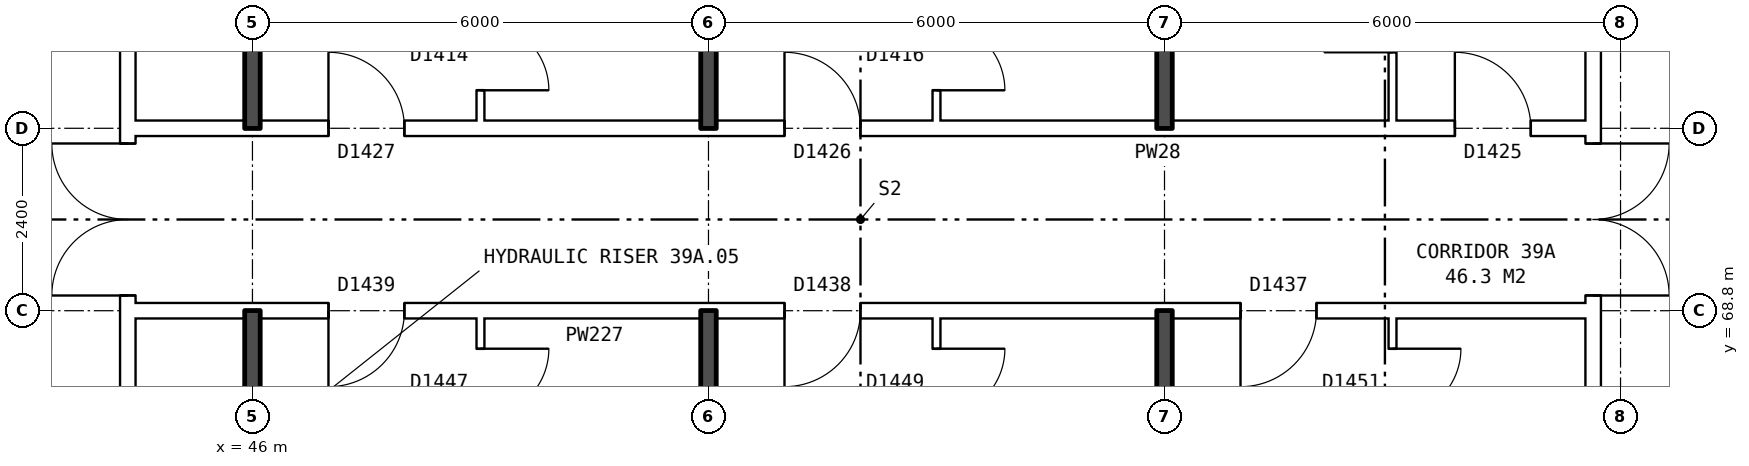
"""IFC4 building model, lengths in metres.
Left out: names, types, materials, properties, quantities, classifications, styles, units other than length and angle.
Written with IfcOpenShell. Run it as: python <this file> out.ifc"""

import sys

from ifc_helpers import new_model, si_unit, direction, frame, frame_2d, origin, place, context, subcontext, project, spatial, rectangle, extrude, element, fill, save


model = new_model("IFC4")
c1 = context("Model", 3, precision=1e-05, world=origin(), true_north=direction((0.0, 1.0)))
c2 = subcontext(c1, "Body", "Model", "MODEL_VIEW")
j1 = project(units=[si_unit("LENGTHUNIT", "METRE"), si_unit("PLANEANGLEUNIT", "RADIAN")], contexts=[c1])
p1 = place(None, origin())
s1 = spatial("IfcSite", under=j1, at=p1, CompositionType="ELEMENT")
p2 = place(p1, origin())
s2 = spatial("IfcBuilding", under=s1, at=p2, CompositionType="ELEMENT")
p3 = place(p2, frame((0.0, 0.0, 139.2)))
s3 = spatial("IfcBuildingStorey", under=s2, at=p3, CompositionType="ELEMENT", Elevation=139.2)
p4 = place(p3, frame((63.64, 63.9, 0.0), z_axis=(0.0, 0.0, 1.0), x_axis=(0.0, 1.0, 0.0)))
e1 = element("IfcWall", 1, at=p4, inside=s3, PredefinedType="PARTITIONING", context=c2, shape_type="SweptSolid", body=[
    extrude(rectangle(XDim=12.2, YDim=0.2, at=frame_2d((6.1, 0.0))), origin(), (0.0, 0.0, 1.0), 2.85),
])
p5 = place(p4, frame((5.1, 0.0, 0.0)))
e2 = element("IfcOpeningElement", 2, at=p5, cuts=e1, PredefinedType="OPENING", context=c2, shape_type="SweptSolid", body=[
    extrude(rectangle(XDim=2.0, YDim=2.1, at=frame_2d((1.0, 1.05))), frame((0.0, 0.11, 0.0), z_axis=(0.0, -1.0, 0.0), x_axis=(1.0, 0.0, 0.0)), (0.0, 0.0, 1.0), 0.22),
])
p6 = place(p3, frame((44.36, 63.9, 0.0), z_axis=(0.0, 0.0, 1.0), x_axis=(0.0, 1.0, 0.0)))
e3 = element("IfcWall", 3, at=p6, inside=s3, PredefinedType="PARTITIONING", context=c2, shape_type="SweptSolid", body=[
    extrude(rectangle(XDim=12.2, YDim=0.2, at=frame_2d((6.1, 0.0))), origin(), (0.0, 0.0, 1.0), 2.85),
])
p7 = place(p6, frame((5.1, 0.0, 0.0)))
e4 = element("IfcOpeningElement", 4, at=p7, cuts=e3, PredefinedType="OPENING", context=c2, shape_type="SweptSolid", body=[
    extrude(rectangle(XDim=2.0, YDim=2.1, at=frame_2d((1.0, 1.05))), frame((0.0, 0.11, 0.0), z_axis=(0.0, -1.0, 0.0), x_axis=(1.0, 0.0, 0.0)), (0.0, 0.0, 1.0), 0.22),
])
p8 = place(p3, frame((44.36, 68.8, 0.0), z_axis=(0.0, 0.0, 1.0), x_axis=(1.0, 0.0, 0.0)))
e5 = element("IfcWall", 5, at=p8, inside=s3, PredefinedType="PARTITIONING", context=c2, shape_type="SweptSolid", body=[
    extrude(rectangle(XDim=19.28, YDim=0.2, at=frame_2d((9.64, 0.0))), origin(), (0.0, 0.0, 1.0), 2.85),
])
p9 = place(p8, frame((14.64, 0.0, 0.0)))
e6 = element("IfcOpeningElement", 6, at=p9, cuts=e5, PredefinedType="OPENING", context=c2, shape_type="SweptSolid", body=[
    extrude(rectangle(XDim=1.0, YDim=2.1, at=frame_2d((0.5, 1.05))), frame((0.0, 0.11, 0.0), z_axis=(0.0, -1.0, 0.0), x_axis=(1.0, 0.0, 0.0)), (0.0, 0.0, 1.0), 0.22),
])
p10 = place(p8, frame((8.64, 0.0, 0.0)))
e7 = element("IfcOpeningElement", 7, at=p10, cuts=e5, PredefinedType="OPENING", context=c2, shape_type="SweptSolid", body=[
    extrude(rectangle(XDim=1.0, YDim=2.1, at=frame_2d((0.5, 1.05))), frame((0.0, 0.11, 0.0), z_axis=(0.0, -1.0, 0.0), x_axis=(1.0, 0.0, 0.0)), (0.0, 0.0, 1.0), 0.22),
])
p11 = place(p8, frame((2.64, 0.0, 0.0)))
e8 = element("IfcOpeningElement", 8, at=p11, cuts=e5, PredefinedType="OPENING", context=c2, shape_type="SweptSolid", body=[
    extrude(rectangle(XDim=1.0, YDim=2.1, at=frame_2d((0.5, 1.05))), frame((0.0, 0.11, 0.0), z_axis=(0.0, -1.0, 0.0), x_axis=(1.0, 0.0, 0.0)), (0.0, 0.0, 1.0), 0.22),
])
p12 = place(p3, frame((44.36, 71.2, 0.0), z_axis=(0.0, 0.0, 1.0), x_axis=(1.0, 0.0, 0.0)))
e9 = element("IfcWall", 9, at=p12, inside=s3, PredefinedType="PARTITIONING", context=c2, shape_type="SweptSolid", body=[
    extrude(rectangle(XDim=19.28, YDim=0.2, at=frame_2d((9.64, 0.0))), origin(), (0.0, 0.0, 1.0), 2.85),
])
p13 = place(p12, frame((17.46, 0.0, 0.0)))
e10 = element("IfcOpeningElement", 10, at=p13, cuts=e9, PredefinedType="OPENING", context=c2, shape_type="SweptSolid", body=[
    extrude(rectangle(XDim=1.0, YDim=2.1, at=frame_2d((0.5, 1.05))), frame((0.0, 0.11, 0.0), z_axis=(0.0, -1.0, 0.0), x_axis=(1.0, 0.0, 0.0)), (0.0, 0.0, 1.0), 0.22),
])
p14 = place(p12, frame((8.64, 0.0, 0.0)))
e11 = element("IfcOpeningElement", 11, at=p14, cuts=e9, PredefinedType="OPENING", context=c2, shape_type="SweptSolid", body=[
    extrude(rectangle(XDim=1.0, YDim=2.1, at=frame_2d((0.5, 1.05))), frame((0.0, 0.11, 0.0), z_axis=(0.0, -1.0, 0.0), x_axis=(1.0, 0.0, 0.0)), (0.0, 0.0, 1.0), 0.22),
])
p15 = place(p12, frame((2.64, 0.0, 0.0)))
e12 = element("IfcOpeningElement", 12, at=p15, cuts=e9, PredefinedType="OPENING", context=c2, shape_type="SweptSolid", body=[
    extrude(rectangle(XDim=1.0, YDim=2.1, at=frame_2d((0.5, 1.05))), frame((0.0, 0.11, 0.0), z_axis=(0.0, -1.0, 0.0), x_axis=(1.0, 0.0, 0.0)), (0.0, 0.0, 1.0), 0.22),
])
for number, where, z_axis, x_axis in (
    (13, (46.0, 63.8, 0.0), (0.0, 0.0, 1.0), (0.0, 1.0, 0.0)),
    (14, (46.0, 71.2, 0.0), (0.0, 0.0, 1.0), (0.0, 1.0, 0.0)),
):
    element("IfcWall", number, at=place(p3, frame(where, z_axis=z_axis, x_axis=x_axis)), inside=s3, PredefinedType="SOLIDWALL", context=c2, shape_type="SweptSolid", body=[
        extrude(rectangle(XDim=5.0, YDim=0.2, at=frame_2d((2.5, 0.0))), origin(), (0.0, 0.0, 1.0), 2.85),
    ])
p16 = place(p3, frame((49.0, 54.36, 0.0), z_axis=(0.0, 0.0, 1.0), x_axis=(0.0, 1.0, 0.0)))
e15 = element("IfcWall", 15, at=p16, inside=s3, PredefinedType="PARTITIONING", context=c2, shape_type="SweptSolid", body=[
    extrude(rectangle(XDim=14.34, YDim=0.1, at=frame_2d((7.17, 0.0))), origin(), (0.0, 0.0, 1.0), 2.85),
])
p17 = place(p16, frame((6.7, 0.0, 0.0)))
e16 = element("IfcOpeningElement", 16, at=p17, cuts=e15, PredefinedType="OPENING", context=c2, shape_type="SweptSolid", body=[
    extrude(rectangle(XDim=0.9, YDim=2.1, at=frame_2d((0.45, 1.05))), frame((0.0, 0.06, 0.0), z_axis=(0.0, -1.0, 0.0), x_axis=(1.0, 0.0, 0.0)), (0.0, 0.0, 1.0), 0.12),
])
p18 = place(p16, frame((13.04, 0.0, 0.0)))
e17 = element("IfcOpeningElement", 17, at=p18, cuts=e15, PredefinedType="OPENING", context=c2, shape_type="SweptSolid", body=[
    extrude(rectangle(XDim=0.9, YDim=2.1, at=frame_2d((0.45, 1.05))), frame((0.0, 0.06, 0.0), z_axis=(0.0, -1.0, 0.0), x_axis=(1.0, 0.0, 0.0)), (0.0, 0.0, 1.0), 0.12),
])
p19 = place(p3, frame((49.0, 71.3, 0.0), z_axis=(0.0, 0.0, 1.0), x_axis=(0.0, 1.0, 0.0)))
e18 = element("IfcWall", 18, at=p19, inside=s3, PredefinedType="PARTITIONING", context=c2, shape_type="SweptSolid", body=[
    extrude(rectangle(XDim=14.34, YDim=0.1, at=frame_2d((7.17, 0.0))), origin(), (0.0, 0.0, 1.0), 2.85),
])
p20 = place(p19, frame((7.94, 0.0, 0.0)))
e19 = element("IfcOpeningElement", 19, at=p20, cuts=e18, PredefinedType="OPENING", context=c2, shape_type="SweptSolid", body=[
    extrude(rectangle(XDim=0.9, YDim=2.1, at=frame_2d((0.45, 1.05))), frame((0.0, 0.06, 0.0), z_axis=(0.0, -1.0, 0.0), x_axis=(1.0, 0.0, 0.0)), (0.0, 0.0, 1.0), 0.12),
])
p21 = place(p19, frame((0.4, 0.0, 0.0)))
e20 = element("IfcOpeningElement", 20, at=p21, cuts=e18, PredefinedType="OPENING", context=c2, shape_type="SweptSolid", body=[
    extrude(rectangle(XDim=0.9, YDim=2.1, at=frame_2d((0.45, 1.05))), frame((0.0, 0.06, 0.0), z_axis=(0.0, -1.0, 0.0), x_axis=(1.0, 0.0, 0.0)), (0.0, 0.0, 1.0), 0.12),
])
for number, where, z_axis, x_axis in (
    (21, (52.0, 54.36, 0.0), (0.0, 0.0, 1.0), (0.0, 1.0, 0.0)),
    (22, (52.0, 71.2, 0.0), (0.0, 0.0, 1.0), (0.0, 1.0, 0.0)),
):
    element("IfcWall", number, at=place(p3, frame(where, z_axis=z_axis, x_axis=x_axis)), inside=s3, PredefinedType="SOLIDWALL", context=c2, shape_type="SweptSolid", body=[
        extrude(rectangle(XDim=14.44, YDim=0.2, at=frame_2d((7.22, 0.0))), origin(), (0.0, 0.0, 1.0), 2.85),
    ])
p22 = place(p3, frame((55.0, 54.36, 0.0), z_axis=(0.0, 0.0, 1.0), x_axis=(0.0, 1.0, 0.0)))
e23 = element("IfcWall", 23, at=p22, inside=s3, PredefinedType="PARTITIONING", context=c2, shape_type="SweptSolid", body=[
    extrude(rectangle(XDim=14.34, YDim=0.1, at=frame_2d((7.17, 0.0))), origin(), (0.0, 0.0, 1.0), 2.85),
])
p23 = place(p22, frame((6.7, 0.0, 0.0)))
e24 = element("IfcOpeningElement", 24, at=p23, cuts=e23, PredefinedType="OPENING", context=c2, shape_type="SweptSolid", body=[
    extrude(rectangle(XDim=0.9, YDim=2.1, at=frame_2d((0.45, 1.05))), frame((0.0, 0.06, 0.0), z_axis=(0.0, -1.0, 0.0), x_axis=(1.0, 0.0, 0.0)), (0.0, 0.0, 1.0), 0.12),
])
p24 = place(p22, frame((13.04, 0.0, 0.0)))
e25 = element("IfcOpeningElement", 25, at=p24, cuts=e23, PredefinedType="OPENING", context=c2, shape_type="SweptSolid", body=[
    extrude(rectangle(XDim=0.9, YDim=2.1, at=frame_2d((0.45, 1.05))), frame((0.0, 0.06, 0.0), z_axis=(0.0, -1.0, 0.0), x_axis=(1.0, 0.0, 0.0)), (0.0, 0.0, 1.0), 0.12),
])
p25 = place(p3, frame((55.0, 71.3, 0.0), z_axis=(0.0, 0.0, 1.0), x_axis=(0.0, 1.0, 0.0)))
e26 = element("IfcWall", 26, at=p25, inside=s3, PredefinedType="PARTITIONING", context=c2, shape_type="SweptSolid", body=[
    extrude(rectangle(XDim=14.34, YDim=0.1, at=frame_2d((7.17, 0.0))), origin(), (0.0, 0.0, 1.0), 2.85),
])
p26 = place(p25, frame((6.74, 0.0, 0.0)))
e27 = element("IfcOpeningElement", 27, at=p26, cuts=e26, PredefinedType="OPENING", context=c2, shape_type="SweptSolid", body=[
    extrude(rectangle(XDim=0.9, YDim=2.1, at=frame_2d((0.45, 1.05))), frame((0.0, 0.06, 0.0), z_axis=(0.0, -1.0, 0.0), x_axis=(1.0, 0.0, 0.0)), (0.0, 0.0, 1.0), 0.12),
])
p27 = place(p25, frame((0.4, 0.0, 0.0)))
e28 = element("IfcOpeningElement", 28, at=p27, cuts=e26, PredefinedType="OPENING", context=c2, shape_type="SweptSolid", body=[
    extrude(rectangle(XDim=0.9, YDim=2.1, at=frame_2d((0.45, 1.05))), frame((0.0, 0.06, 0.0), z_axis=(0.0, -1.0, 0.0), x_axis=(1.0, 0.0, 0.0)), (0.0, 0.0, 1.0), 0.12),
])
for number, where, z_axis, x_axis in (
    (29, (58.0, 54.36, 0.0), (0.0, 0.0, 1.0), (0.0, 1.0, 0.0)),
    (30, (58.0, 71.2, 0.0), (0.0, 0.0, 1.0), (0.0, 1.0, 0.0)),
):
    element("IfcWall", number, at=place(p3, frame(where, z_axis=z_axis, x_axis=x_axis)), inside=s3, PredefinedType="SOLIDWALL", context=c2, shape_type="SweptSolid", body=[
        extrude(rectangle(XDim=14.44, YDim=0.2, at=frame_2d((7.22, 0.0))), origin(), (0.0, 0.0, 1.0), 2.85),
    ])
p28 = place(p3, frame((61.0, 54.36, 0.0), z_axis=(0.0, 0.0, 1.0), x_axis=(0.0, 1.0, 0.0)))
e31 = element("IfcWall", 31, at=p28, inside=s3, PredefinedType="PARTITIONING", context=c2, shape_type="SweptSolid", body=[
    extrude(rectangle(XDim=14.34, YDim=0.1, at=frame_2d((7.17, 0.0))), origin(), (0.0, 0.0, 1.0), 2.85),
])
p29 = place(p28, frame((4.2, 0.0, 0.0)))
e32 = element("IfcOpeningElement", 32, at=p29, cuts=e31, PredefinedType="OPENING", context=c2, shape_type="SweptSolid", body=[
    extrude(rectangle(XDim=0.9, YDim=2.1, at=frame_2d((0.45, 1.05))), frame((0.0, 0.06, 0.0), z_axis=(0.0, -1.0, 0.0), x_axis=(1.0, 0.0, 0.0)), (0.0, 0.0, 1.0), 0.12),
])
p30 = place(p28, frame((13.04, 0.0, 0.0)))
e33 = element("IfcOpeningElement", 33, at=p30, cuts=e31, PredefinedType="OPENING", context=c2, shape_type="SweptSolid", body=[
    extrude(rectangle(XDim=0.9, YDim=2.1, at=frame_2d((0.45, 1.05))), frame((0.0, 0.06, 0.0), z_axis=(0.0, -1.0, 0.0), x_axis=(1.0, 0.0, 0.0)), (0.0, 0.0, 1.0), 0.12),
])
p31 = place(p3, frame((61.0, 71.3, 0.0), z_axis=(0.0, 0.0, 1.0), x_axis=(0.0, 1.0, 0.0)))
e34 = element("IfcWall", 34, at=p31, inside=s3, PredefinedType="PARTITIONING", context=c2, shape_type="SweptSolid", body=[
    extrude(rectangle(XDim=14.34, YDim=0.1, at=frame_2d((7.17, 0.0))), origin(), (0.0, 0.0, 1.0), 2.85),
])
p32 = place(p31, frame((7.94, 0.0, 0.0)))
e35 = element("IfcOpeningElement", 35, at=p32, cuts=e34, PredefinedType="OPENING", context=c2, shape_type="SweptSolid", body=[
    extrude(rectangle(XDim=0.9, YDim=2.1, at=frame_2d((0.45, 1.05))), frame((0.0, 0.06, 0.0), z_axis=(0.0, -1.0, 0.0), x_axis=(1.0, 0.0, 0.0)), (0.0, 0.0, 1.0), 0.12),
])
p33 = place(p31, frame((0.9, 0.0, 0.0)))
e36 = element("IfcOpeningElement", 36, at=p33, cuts=e34, PredefinedType="OPENING", context=c2, shape_type="SweptSolid", body=[
    extrude(rectangle(XDim=0.9, YDim=2.1, at=frame_2d((0.45, 1.05))), frame((0.0, 0.06, 0.0), z_axis=(0.0, -1.0, 0.0), x_axis=(1.0, 0.0, 0.0)), (0.0, 0.0, 1.0), 0.12),
])
p34 = place(p5, frame((2.0, 0.0, 0.0), z_axis=(0.0, 0.0, 1.0), x_axis=(-1.0, 0.0, 0.0)))
e37 = element("IfcDoor", 37, at=p34, inside=s3, OperationType="DOUBLE_DOOR_SINGLE_SWING", PredefinedType="DOOR", context=c2, shape_type="SweptSolid", body=[
    extrude(rectangle(XDim=2.0, YDim=2.1, at=frame_2d((1.0, 1.05))), frame((0.0, 0.025, 0.0), z_axis=(0.0, -1.0, 0.0), x_axis=(1.0, 0.0, 0.0)), (0.0, 0.0, 1.0), 0.05),
])
fill(e2, e37)
p35 = place(p7, origin())
e38 = element("IfcDoor", 38, at=p35, inside=s3, OperationType="DOUBLE_DOOR_SINGLE_SWING", PredefinedType="DOOR", context=c2, shape_type="SweptSolid", body=[
    extrude(rectangle(XDim=2.0, YDim=2.1, at=frame_2d((1.0, 1.05))), frame((0.0, 0.025, 0.0), z_axis=(0.0, -1.0, 0.0), x_axis=(1.0, 0.0, 0.0)), (0.0, 0.0, 1.0), 0.05),
])
fill(e4, e38)
p36 = place(p9, frame((1.0, 0.0, 0.0), z_axis=(0.0, 0.0, 1.0), x_axis=(-1.0, 0.0, 0.0)))
e39 = element("IfcDoor", 39, at=p36, inside=s3, OperationType="SINGLE_SWING_RIGHT", PredefinedType="DOOR", context=c2, shape_type="SweptSolid", body=[
    extrude(rectangle(XDim=1.0, YDim=2.1, at=frame_2d((0.5, 1.05))), frame((0.0, 0.025, 0.0), z_axis=(0.0, -1.0, 0.0), x_axis=(1.0, 0.0, 0.0)), (0.0, 0.0, 1.0), 0.05),
])
fill(e6, e39)
p37 = place(p30, frame((0.9, 0.0, 0.0), z_axis=(0.0, 0.0, 1.0), x_axis=(-1.0, 0.0, 0.0)))
e40 = element("IfcDoor", 40, at=p37, inside=s3, OperationType="SINGLE_SWING_LEFT", PredefinedType="DOOR", context=c2, shape_type="SweptSolid", body=[
    extrude(rectangle(XDim=0.9, YDim=2.1, at=frame_2d((0.45, 1.05))), frame((0.0, 0.025, 0.0), z_axis=(0.0, -1.0, 0.0), x_axis=(1.0, 0.0, 0.0)), (0.0, 0.0, 1.0), 0.05),
])
fill(e33, e40)
p38 = place(p10, frame((1.0, 0.0, 0.0), z_axis=(0.0, 0.0, 1.0), x_axis=(-1.0, 0.0, 0.0)))
e41 = element("IfcDoor", 41, at=p38, inside=s3, OperationType="SINGLE_SWING_RIGHT", PredefinedType="DOOR", context=c2, shape_type="SweptSolid", body=[
    extrude(rectangle(XDim=1.0, YDim=2.1, at=frame_2d((0.5, 1.05))), frame((0.0, 0.025, 0.0), z_axis=(0.0, -1.0, 0.0), x_axis=(1.0, 0.0, 0.0)), (0.0, 0.0, 1.0), 0.05),
])
fill(e7, e41)
p39 = place(p24, frame((0.9, 0.0, 0.0), z_axis=(0.0, 0.0, 1.0), x_axis=(-1.0, 0.0, 0.0)))
e42 = element("IfcDoor", 42, at=p39, inside=s3, OperationType="SINGLE_SWING_LEFT", PredefinedType="DOOR", context=c2, shape_type="SweptSolid", body=[
    extrude(rectangle(XDim=0.9, YDim=2.1, at=frame_2d((0.45, 1.05))), frame((0.0, 0.025, 0.0), z_axis=(0.0, -1.0, 0.0), x_axis=(1.0, 0.0, 0.0)), (0.0, 0.0, 1.0), 0.05),
])
fill(e25, e42)
p40 = place(p11, frame((1.0, 0.0, 0.0), z_axis=(0.0, 0.0, 1.0), x_axis=(-1.0, 0.0, 0.0)))
e43 = element("IfcDoor", 43, at=p40, inside=s3, OperationType="SINGLE_SWING_RIGHT", PredefinedType="DOOR", context=c2, shape_type="SweptSolid", body=[
    extrude(rectangle(XDim=1.0, YDim=2.1, at=frame_2d((0.5, 1.05))), frame((0.0, 0.025, 0.0), z_axis=(0.0, -1.0, 0.0), x_axis=(1.0, 0.0, 0.0)), (0.0, 0.0, 1.0), 0.05),
])
fill(e8, e43)
p41 = place(p18, frame((0.9, 0.0, 0.0), z_axis=(0.0, 0.0, 1.0), x_axis=(-1.0, 0.0, 0.0)))
e44 = element("IfcDoor", 44, at=p41, inside=s3, OperationType="SINGLE_SWING_LEFT", PredefinedType="DOOR", context=c2, shape_type="SweptSolid", body=[
    extrude(rectangle(XDim=0.9, YDim=2.1, at=frame_2d((0.45, 1.05))), frame((0.0, 0.025, 0.0), z_axis=(0.0, -1.0, 0.0), x_axis=(1.0, 0.0, 0.0)), (0.0, 0.0, 1.0), 0.05),
])
fill(e17, e44)
p42 = place(p13, origin())
e45 = element("IfcDoor", 45, at=p42, inside=s3, OperationType="SINGLE_SWING_LEFT", PredefinedType="DOOR", context=c2, shape_type="SweptSolid", body=[
    extrude(rectangle(XDim=1.0, YDim=2.1, at=frame_2d((0.5, 1.05))), frame((0.0, 0.025, 0.0), z_axis=(0.0, -1.0, 0.0), x_axis=(1.0, 0.0, 0.0)), (0.0, 0.0, 1.0), 0.05),
])
fill(e10, e45)
p43 = place(p14, origin())
e46 = element("IfcDoor", 46, at=p43, inside=s3, OperationType="SINGLE_SWING_LEFT", PredefinedType="DOOR", context=c2, shape_type="SweptSolid", body=[
    extrude(rectangle(XDim=1.0, YDim=2.1, at=frame_2d((0.5, 1.05))), frame((0.0, 0.025, 0.0), z_axis=(0.0, -1.0, 0.0), x_axis=(1.0, 0.0, 0.0)), (0.0, 0.0, 1.0), 0.05),
])
fill(e11, e46)
p44 = place(p27, frame((0.9, 0.0, 0.0), z_axis=(0.0, 0.0, 1.0), x_axis=(-1.0, 0.0, 0.0)))
e47 = element("IfcDoor", 47, at=p44, inside=s3, OperationType="SINGLE_SWING_RIGHT", PredefinedType="DOOR", context=c2, shape_type="SweptSolid", body=[
    extrude(rectangle(XDim=0.9, YDim=2.1, at=frame_2d((0.45, 1.05))), frame((0.0, 0.025, 0.0), z_axis=(0.0, -1.0, 0.0), x_axis=(1.0, 0.0, 0.0)), (0.0, 0.0, 1.0), 0.05),
])
fill(e28, e47)
p45 = place(p15, origin())
e48 = element("IfcDoor", 48, at=p45, inside=s3, OperationType="SINGLE_SWING_LEFT", PredefinedType="DOOR", context=c2, shape_type="SweptSolid", body=[
    extrude(rectangle(XDim=1.0, YDim=2.1, at=frame_2d((0.5, 1.05))), frame((0.0, 0.025, 0.0), z_axis=(0.0, -1.0, 0.0), x_axis=(1.0, 0.0, 0.0)), (0.0, 0.0, 1.0), 0.05),
])
fill(e12, e48)
p46 = place(p21, frame((0.9, 0.0, 0.0), z_axis=(0.0, 0.0, 1.0), x_axis=(-1.0, 0.0, 0.0)))
e49 = element("IfcDoor", 49, at=p46, inside=s3, OperationType="SINGLE_SWING_RIGHT", PredefinedType="DOOR", context=c2, shape_type="SweptSolid", body=[
    extrude(rectangle(XDim=0.9, YDim=2.1, at=frame_2d((0.45, 1.05))), frame((0.0, 0.025, 0.0), z_axis=(0.0, -1.0, 0.0), x_axis=(1.0, 0.0, 0.0)), (0.0, 0.0, 1.0), 0.05),
])
fill(e20, e49)
save(model, sys.argv[1])
